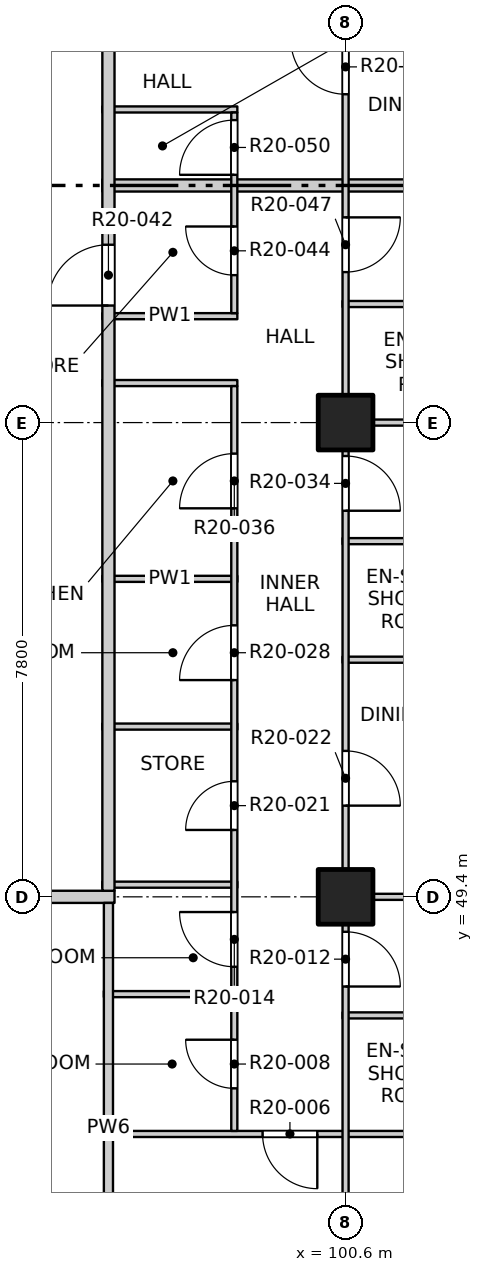
"""IFC4 building model, lengths in metres.
Left out: names, types, materials, properties, quantities, classifications, styles, units other than length and angle.
Written with IfcOpenShell. Run it as: python <this file> out.ifc"""

import sys

from ifc_helpers import new_model, si_unit, direction, frame, frame_2d, origin, origin_2d, place, context, subcontext, project, spatial, rectangle, extrude, element, fill, save


model = new_model("IFC4")
c1 = context("Model", 3, precision=1e-05, world=origin(), true_north=direction((0.0, 1.0)))
c2 = subcontext(c1, "Body", "Model", "MODEL_VIEW")
j1 = project(units=[si_unit("LENGTHUNIT", "METRE"), si_unit("PLANEANGLEUNIT", "RADIAN")], contexts=[c1])
p1 = place(None, origin())
s1 = spatial("IfcSite", under=j1, at=p1, CompositionType="ELEMENT")
p2 = place(p1, origin())
s2 = spatial("IfcBuilding", under=s1, at=p2, CompositionType="ELEMENT")
p3 = place(p2, frame((0.0, 0.0, 210.9)))
s3 = spatial("IfcBuildingStorey", under=s2, at=p3, CompositionType="ELEMENT", Elevation=210.9)
for number, where, z_axis, x_axis in (
    (1, (100.6, 49.4, -0.25), (0.0, 0.0, 1.0), (1.0, 0.0, 0.0)),
    (2, (100.6, 57.2, -0.25), (0.0, 0.0, 1.0), (1.0, 0.0, 0.0)),
):
    element("IfcColumn", number, at=place(p3, frame(where, z_axis=z_axis, x_axis=x_axis)), inside=s3, PredefinedType="COLUMN", context=c2, shape_type="SweptSolid", body=[
        extrude(rectangle(XDim=0.9, YDim=0.9, at=origin_2d()), origin(), (0.0, 0.0, 1.0), 3.4),
    ])
p4 = place(p3, frame((96.625, 45.5, 0.0), z_axis=(0.0, 0.0, 1.0), x_axis=(1.0, 0.0, 0.0)))
e3 = element("IfcWall", 3, at=p4, inside=s3, PredefinedType="PARTITIONING", context=c2, shape_type="SweptSolid", body=[
    extrude(rectangle(XDim=11.475, YDim=0.1, at=frame_2d((5.738, 0.0))), origin(), (0.0, 0.0, 1.0), 3.15),
])
p5 = place(p4, frame((2.61, 0.0, 0.0)))
e4 = element("IfcOpeningElement", 4, at=p5, cuts=e3, PredefinedType="OPENING", context=c2, shape_type="SweptSolid", body=[
    extrude(rectangle(XDim=0.9, YDim=2.1, at=frame_2d((0.45, 1.05))), frame((0.0, 0.06, 0.0), z_axis=(0.0, -1.0, 0.0), x_axis=(1.0, 0.0, 0.0)), (0.0, 0.0, 1.0), 0.12),
])
p6 = place(p3, frame((100.55, 47.45, 0.0), z_axis=(0.0, 0.0, 1.0), x_axis=(1.0, 0.0, 0.0)))
e5 = element("IfcWall", 5, at=p6, inside=s3, PredefinedType="PARTITIONING", context=c2, shape_type="SweptSolid", body=[
    extrude(rectangle(XDim=3.4, YDim=0.1, at=frame_2d((1.7, 0.0))), origin(), (0.0, 0.0, 1.0), 3.15),
])
p7 = place(p3, frame((96.625, 47.8, 0.0), z_axis=(0.0, 0.0, 1.0), x_axis=(1.0, 0.0, 0.0)))
e6 = element("IfcWall", 6, at=p7, inside=s3, PredefinedType="PARTITIONING", context=c2, shape_type="SweptSolid", body=[
    extrude(rectangle(XDim=2.195, YDim=0.1, at=frame_2d((1.098, 0.0))), origin(), (0.0, 0.0, 1.0), 3.15),
])
p8 = place(p3, frame((73.2, 49.4, 0.0), z_axis=(0.0, 0.0, 1.0), x_axis=(1.0, 0.0, 0.0)))
e7 = element("IfcWall", 7, at=p8, inside=s3, PredefinedType="PARTITIONING", context=c2, shape_type="SweptSolid", body=[
    extrude(rectangle(XDim=23.6, YDim=0.2, at=frame_2d((11.8, 0.0))), origin(), (0.0, 0.0, 1.0), 3.15),
])
p9 = place(p8, frame((1.6, 0.0, 0.0)))
e8 = element("IfcOpeningElement", 8, at=p9, cuts=e7, PredefinedType="OPENING", context=c2, shape_type="SweptSolid", body=[
    extrude(rectangle(XDim=0.9, YDim=2.1, at=frame_2d((0.45, 1.05))), frame((0.0, 0.11, 0.0), z_axis=(0.0, -1.0, 0.0), x_axis=(1.0, 0.0, 0.0)), (0.0, 0.0, 1.0), 0.22),
])
p10 = place(p8, frame((5.5, 0.0, 0.0)))
e9 = element("IfcOpeningElement", 9, at=p10, cuts=e7, PredefinedType="OPENING", context=c2, shape_type="SweptSolid", body=[
    extrude(rectangle(XDim=0.9, YDim=2.1, at=frame_2d((0.45, 1.05))), frame((0.0, 0.11, 0.0), z_axis=(0.0, -1.0, 0.0), x_axis=(1.0, 0.0, 0.0)), (0.0, 0.0, 1.0), 0.22),
])
p11 = place(p8, frame((12.375, 0.0, 0.0)))
e10 = element("IfcOpeningElement", 10, at=p11, cuts=e7, PredefinedType="OPENING", context=c2, shape_type="SweptSolid", body=[
    extrude(rectangle(XDim=1.2, YDim=2.1, at=frame_2d((0.6, 1.05))), frame((0.0, 0.11, 0.0), z_axis=(0.0, -1.0, 0.0), x_axis=(1.0, 0.0, 0.0)), (0.0, 0.0, 1.0), 0.22),
])
p12 = place(p8, frame((20.15, 0.0, 0.0)))
e11 = element("IfcOpeningElement", 11, at=p12, cuts=e7, PredefinedType="OPENING", context=c2, shape_type="SweptSolid", body=[
    extrude(rectangle(XDim=1.2, YDim=2.1, at=frame_2d((0.6, 1.05))), frame((0.0, 0.11, 0.0), z_axis=(0.0, -1.0, 0.0), x_axis=(1.0, 0.0, 0.0)), (0.0, 0.0, 1.0), 0.22),
])
p13 = place(p3, frame((100.55, 49.4, 0.0), z_axis=(0.0, 0.0, 1.0), x_axis=(1.0, 0.0, 0.0)))
e12 = element("IfcWall", 12, at=p13, inside=s3, PredefinedType="PARTITIONING", context=c2, shape_type="SweptSolid", body=[
    extrude(rectangle(XDim=7.55, YDim=0.1, at=frame_2d((3.775, 0.0))), origin(), (0.0, 0.0, 1.0), 3.15),
])
for number, where, z_axis, x_axis in (
    (13, (96.6, 49.6, 0.0), (0.0, 0.0, 1.0), (1.0, 0.0, 0.0)),
    (14, (96.6, 52.2, 0.0), (0.0, 0.0, 1.0), (1.0, 0.0, 0.0)),
):
    element("IfcWall", number, at=place(p3, frame(where, z_axis=z_axis, x_axis=x_axis)), inside=s3, PredefinedType="PARTITIONING", context=c2, shape_type="SweptSolid", body=[
        extrude(rectangle(XDim=2.22, YDim=0.1, at=frame_2d((1.11, 0.0))), origin(), (0.0, 0.0, 1.0), 3.15),
    ])
p14 = place(p3, frame((100.55, 53.3, 0.0), z_axis=(0.0, 0.0, 1.0), x_axis=(1.0, 0.0, 0.0)))
e15 = element("IfcWall", 15, at=p14, inside=s3, PredefinedType="PARTITIONING", context=c2, shape_type="SweptSolid", body=[
    extrude(rectangle(XDim=7.55, YDim=0.1, at=frame_2d((3.775, 0.0))), origin(), (0.0, 0.0, 1.0), 3.15),
])
p15 = place(p3, frame((96.6, 54.63, 0.0), z_axis=(0.0, 0.0, 1.0), x_axis=(1.0, 0.0, 0.0)))
e16 = element("IfcWall", 16, at=p15, inside=s3, PredefinedType="PARTITIONING", context=c2, shape_type="SweptSolid", body=[
    extrude(rectangle(XDim=2.22, YDim=0.1, at=frame_2d((1.11, 0.0))), origin(), (0.0, 0.0, 1.0), 3.15),
])
p16 = place(p3, frame((100.55, 55.25, 0.0), z_axis=(0.0, 0.0, 1.0), x_axis=(1.0, 0.0, 0.0)))
e17 = element("IfcWall", 17, at=p16, inside=s3, PredefinedType="PARTITIONING", context=c2, shape_type="SweptSolid", body=[
    extrude(rectangle(XDim=3.4, YDim=0.1, at=frame_2d((1.7, 0.0))), origin(), (0.0, 0.0, 1.0), 3.15),
])
p17 = place(p3, frame((100.55, 57.2, 0.0), z_axis=(0.0, 0.0, 1.0), x_axis=(1.0, 0.0, 0.0)))
e18 = element("IfcWall", 18, at=p17, inside=s3, PredefinedType="PARTITIONING", context=c2, shape_type="SweptSolid", body=[
    extrude(rectangle(XDim=7.55, YDim=0.1, at=frame_2d((3.775, 0.0))), origin(), (0.0, 0.0, 1.0), 3.15),
])
for number, where, z_axis, x_axis in (
    (19, (96.6, 57.85, 0.0), (0.0, 0.0, 1.0), (1.0, 0.0, 0.0)),
    (20, (96.6, 58.95, 0.0), (0.0, 0.0, 1.0), (1.0, 0.0, 0.0)),
):
    element("IfcWall", number, at=place(p3, frame(where, z_axis=z_axis, x_axis=x_axis)), inside=s3, PredefinedType="PARTITIONING", context=c2, shape_type="SweptSolid", body=[
        extrude(rectangle(XDim=2.22, YDim=0.1, at=frame_2d((1.11, 0.0))), origin(), (0.0, 0.0, 1.0), 3.15),
    ])
p18 = place(p3, frame((100.55, 59.15, 0.0), z_axis=(0.0, 0.0, 1.0), x_axis=(1.0, 0.0, 0.0)))
e21 = element("IfcWall", 21, at=p18, inside=s3, PredefinedType="PARTITIONING", context=c2, shape_type="SweptSolid", body=[
    extrude(rectangle(XDim=3.4, YDim=0.1, at=frame_2d((1.7, 0.0))), origin(), (0.0, 0.0, 1.0), 3.15),
])
p19 = place(p3, frame((96.6, 61.1, 0.0), z_axis=(0.0, 0.0, 1.0), x_axis=(1.0, 0.0, 0.0)))
e22 = element("IfcWall", 22, at=p19, inside=s3, PredefinedType="PARTITIONING", context=c2, shape_type="SweptSolid", body=[
    extrude(rectangle(XDim=11.5, YDim=0.2, at=frame_2d((5.75, 0.0))), origin(), (0.0, 0.0, 1.0), 2.55),
])
p20 = place(p3, frame((96.6, 62.35, 0.0), z_axis=(0.0, 0.0, 1.0), x_axis=(1.0, 0.0, 0.0)))
e23 = element("IfcWall", 23, at=p20, inside=s3, PredefinedType="PARTITIONING", context=c2, shape_type="SweptSolid", body=[
    extrude(rectangle(XDim=2.22, YDim=0.1, at=frame_2d((1.11, 0.0))), origin(), (0.0, 0.0, 1.0), 3.15),
])
p21 = place(p3, frame((96.7, 41.9, 0.0), z_axis=(0.0, 0.0, 1.0), x_axis=(0.0, 1.0, 0.0)))
e24 = element("IfcWall", 24, at=p21, inside=s3, PredefinedType="PARTITIONING", context=c2, shape_type="SweptSolid", body=[
    extrude(rectangle(XDim=7.4, YDim=0.15, at=frame_2d((3.7, 0.0))), origin(), (0.0, 0.0, 1.0), 3.15),
])
p22 = place(p3, frame((96.7, 49.5, 0.0), z_axis=(0.0, 0.0, 1.0), x_axis=(0.0, 1.0, 0.0)))
e25 = element("IfcWall", 25, at=p22, inside=s3, PredefinedType="PARTITIONING", context=c2, shape_type="SweptSolid", body=[
    extrude(rectangle(XDim=34.9, YDim=0.2, at=frame_2d((17.45, 0.0))), origin(), (0.0, 0.0, 1.0), 3.15),
])
p23 = place(p22, frame((9.625, 0.0, 0.0)))
e26 = element("IfcOpeningElement", 26, at=p23, cuts=e25, PredefinedType="OPENING", context=c2, shape_type="SweptSolid", body=[
    extrude(rectangle(XDim=1.0, YDim=2.1, at=frame_2d((0.5, 1.05))), frame((0.0, 0.11, 0.0), z_axis=(0.0, -1.0, 0.0), x_axis=(1.0, 0.0, 0.0)), (0.0, 0.0, 1.0), 0.22),
])
p24 = place(p22, frame((14.125, 0.0, 0.0)))
e27 = element("IfcOpeningElement", 27, at=p24, cuts=e25, PredefinedType="OPENING", context=c2, shape_type="SweptSolid", body=[
    extrude(rectangle(XDim=1.0, YDim=2.1, at=frame_2d((0.5, 1.05))), frame((0.0, 0.11, 0.0), z_axis=(0.0, -1.0, 0.0), x_axis=(1.0, 0.0, 0.0)), (0.0, 0.0, 1.0), 0.22),
])
p25 = place(p22, frame((29.275, 0.0, 0.0)))
e28 = element("IfcOpeningElement", 28, at=p25, cuts=e25, PredefinedType="OPENING", context=c2, shape_type="SweptSolid", body=[
    extrude(rectangle(XDim=1.0, YDim=2.1, at=frame_2d((0.5, 1.05))), frame((0.0, 0.11, 0.0), z_axis=(0.0, -1.0, 0.0), x_axis=(1.0, 0.0, 0.0)), (0.0, 0.0, 1.0), 0.22),
])
p26 = place(p3, frame((98.77, 45.55, 0.0), z_axis=(0.0, 0.0, 1.0), x_axis=(0.0, 1.0, 0.0)))
e29 = element("IfcWall", 29, at=p26, inside=s3, PredefinedType="PARTITIONING", context=c2, shape_type="SweptSolid", body=[
    extrude(rectangle(XDim=12.25, YDim=0.1, at=frame_2d((6.125, 0.0))), origin(), (0.0, 0.0, 1.0), 3.15),
])
p27 = place(p26, frame((0.7, 0.0, 0.0)))
e30 = element("IfcOpeningElement", 30, at=p27, cuts=e29, PredefinedType="OPENING", context=c2, shape_type="SweptSolid", body=[
    extrude(rectangle(XDim=0.8, YDim=2.1, at=frame_2d((0.4, 1.05))), frame((0.0, 0.06, 0.0), z_axis=(0.0, -1.0, 0.0), x_axis=(1.0, 0.0, 0.0)), (0.0, 0.0, 1.0), 0.12),
])
p28 = place(p26, frame((2.7, 0.0, 0.0)))
e31 = element("IfcOpeningElement", 31, at=p28, cuts=e29, PredefinedType="OPENING", context=c2, shape_type="SweptSolid", body=[
    extrude(rectangle(XDim=0.9, YDim=2.1, at=frame_2d((0.45, 1.05))), frame((0.0, 0.06, 0.0), z_axis=(0.0, -1.0, 0.0), x_axis=(1.0, 0.0, 0.0)), (0.0, 0.0, 1.0), 0.12),
])
p29 = place(p26, frame((4.95, 0.0, 0.0)))
e32 = element("IfcOpeningElement", 32, at=p29, cuts=e29, PredefinedType="OPENING", context=c2, shape_type="SweptSolid", body=[
    extrude(rectangle(XDim=0.8, YDim=2.1, at=frame_2d((0.4, 1.05))), frame((0.0, 0.06, 0.0), z_axis=(0.0, -1.0, 0.0), x_axis=(1.0, 0.0, 0.0)), (0.0, 0.0, 1.0), 0.12),
])
p30 = place(p26, frame((7.415, 0.0, 0.0)))
e33 = element("IfcOpeningElement", 33, at=p30, cuts=e29, PredefinedType="OPENING", context=c2, shape_type="SweptSolid", body=[
    extrude(rectangle(XDim=0.9, YDim=2.1, at=frame_2d((0.45, 1.05))), frame((0.0, 0.06, 0.0), z_axis=(0.0, -1.0, 0.0), x_axis=(1.0, 0.0, 0.0)), (0.0, 0.0, 1.0), 0.12),
])
p31 = place(p26, frame((10.24, 0.0, 0.0)))
e34 = element("IfcOpeningElement", 34, at=p31, cuts=e29, PredefinedType="OPENING", context=c2, shape_type="SweptSolid", body=[
    extrude(rectangle(XDim=0.9, YDim=2.1, at=frame_2d((0.45, 1.05))), frame((0.0, 0.06, 0.0), z_axis=(0.0, -1.0, 0.0), x_axis=(1.0, 0.0, 0.0)), (0.0, 0.0, 1.0), 0.12),
])
p32 = place(p3, frame((98.77, 59.0, 0.0), z_axis=(0.0, 0.0, 1.0), x_axis=(0.0, 1.0, 0.0)))
e35 = element("IfcWall", 35, at=p32, inside=s3, PredefinedType="PARTITIONING", context=c2, shape_type="SweptSolid", body=[
    extrude(rectangle(XDim=3.3, YDim=0.1, at=frame_2d((1.65, 0.0))), origin(), (0.0, 0.0, 1.0), 3.15),
])
p33 = place(p32, frame((0.625, 0.0, 0.0)))
e36 = element("IfcOpeningElement", 36, at=p33, cuts=e35, PredefinedType="OPENING", context=c2, shape_type="SweptSolid", body=[
    extrude(rectangle(XDim=0.8, YDim=2.1, at=frame_2d((0.4, 1.05))), frame((0.0, 0.06, 0.0), z_axis=(0.0, -1.0, 0.0), x_axis=(1.0, 0.0, 0.0)), (0.0, 0.0, 1.0), 0.12),
])
p34 = place(p32, frame((2.275, 0.0, 0.0)))
e37 = element("IfcOpeningElement", 37, at=p34, cuts=e35, PredefinedType="OPENING", context=c2, shape_type="SweptSolid", body=[
    extrude(rectangle(XDim=0.9, YDim=2.1, at=frame_2d((0.45, 1.05))), frame((0.0, 0.06, 0.0), z_axis=(0.0, -1.0, 0.0), x_axis=(1.0, 0.0, 0.0)), (0.0, 0.0, 1.0), 0.12),
])
p35 = place(p3, frame((100.6, 41.9, 0.0), z_axis=(0.0, 0.0, 1.0), x_axis=(0.0, 1.0, 0.0)))
e38 = element("IfcWall", 38, at=p35, inside=s3, PredefinedType="PARTITIONING", context=c2, shape_type="SweptSolid", body=[
    extrude(rectangle(XDim=46.2, YDim=0.1, at=frame_2d((23.1, 0.0))), origin(), (0.0, 0.0, 1.0), 3.15),
])
p36 = place(p35, frame((1.2, 0.0, 0.0)))
e39 = element("IfcOpeningElement", 39, at=p36, cuts=e38, PredefinedType="OPENING", context=c2, shape_type="SweptSolid", body=[
    extrude(rectangle(XDim=0.9, YDim=2.1, at=frame_2d((0.45, 1.05))), frame((0.0, 0.06, 0.0), z_axis=(0.0, -1.0, 0.0), x_axis=(1.0, 0.0, 0.0)), (0.0, 0.0, 1.0), 0.12),
])
p37 = place(p35, frame((6.025, 0.0, 0.0)))
e40 = element("IfcOpeningElement", 40, at=p37, cuts=e38, PredefinedType="OPENING", context=c2, shape_type="SweptSolid", body=[
    extrude(rectangle(XDim=0.9, YDim=2.1, at=frame_2d((0.45, 1.05))), frame((0.0, 0.06, 0.0), z_axis=(0.0, -1.0, 0.0), x_axis=(1.0, 0.0, 0.0)), (0.0, 0.0, 1.0), 0.12),
])
p38 = place(p35, frame((9.0, 0.0, 0.0)))
e41 = element("IfcOpeningElement", 41, at=p38, cuts=e38, PredefinedType="OPENING", context=c2, shape_type="SweptSolid", body=[
    extrude(rectangle(XDim=0.9, YDim=2.1, at=frame_2d((0.45, 1.05))), frame((0.0, 0.06, 0.0), z_axis=(0.0, -1.0, 0.0), x_axis=(1.0, 0.0, 0.0)), (0.0, 0.0, 1.0), 0.12),
])
p39 = place(p35, frame((13.85, 0.0, 0.0)))
e42 = element("IfcOpeningElement", 42, at=p39, cuts=e38, PredefinedType="OPENING", context=c2, shape_type="SweptSolid", body=[
    extrude(rectangle(XDim=0.9, YDim=2.1, at=frame_2d((0.45, 1.05))), frame((0.0, 0.06, 0.0), z_axis=(0.0, -1.0, 0.0), x_axis=(1.0, 0.0, 0.0)), (0.0, 0.0, 1.0), 0.12),
])
p40 = place(p35, frame((17.775, 0.0, 0.0)))
e43 = element("IfcOpeningElement", 43, at=p40, cuts=e38, PredefinedType="OPENING", context=c2, shape_type="SweptSolid", body=[
    extrude(rectangle(XDim=0.9, YDim=2.1, at=frame_2d((0.45, 1.05))), frame((0.0, 0.06, 0.0), z_axis=(0.0, -1.0, 0.0), x_axis=(1.0, 0.0, 0.0)), (0.0, 0.0, 1.0), 0.12),
])
p41 = place(p35, frame((20.7, 0.0, 0.0)))
e44 = element("IfcOpeningElement", 44, at=p41, cuts=e38, PredefinedType="OPENING", context=c2, shape_type="SweptSolid", body=[
    extrude(rectangle(XDim=0.9, YDim=2.1, at=frame_2d((0.45, 1.05))), frame((0.0, 0.06, 0.0), z_axis=(0.0, -1.0, 0.0), x_axis=(1.0, 0.0, 0.0)), (0.0, 0.0, 1.0), 0.12),
])
p42 = place(p35, frame((24.6, 0.0, 0.0)))
e45 = element("IfcOpeningElement", 45, at=p42, cuts=e38, PredefinedType="OPENING", context=c2, shape_type="SweptSolid", body=[
    extrude(rectangle(XDim=0.9, YDim=2.1, at=frame_2d((0.45, 1.05))), frame((0.0, 0.06, 0.0), z_axis=(0.0, -1.0, 0.0), x_axis=(1.0, 0.0, 0.0)), (0.0, 0.0, 1.0), 0.12),
])
p43 = place(p35, frame((29.425, 0.0, 0.0)))
e46 = element("IfcOpeningElement", 46, at=p43, cuts=e38, PredefinedType="OPENING", context=c2, shape_type="SweptSolid", body=[
    extrude(rectangle(XDim=0.9, YDim=2.1, at=frame_2d((0.45, 1.05))), frame((0.0, 0.06, 0.0), z_axis=(0.0, -1.0, 0.0), x_axis=(1.0, 0.0, 0.0)), (0.0, 0.0, 1.0), 0.12),
])
p44 = place(p35, frame((33.375, 0.0, 0.0)))
e47 = element("IfcOpeningElement", 47, at=p44, cuts=e38, PredefinedType="OPENING", context=c2, shape_type="SweptSolid", body=[
    extrude(rectangle(XDim=0.9, YDim=2.1, at=frame_2d((0.45, 1.05))), frame((0.0, 0.06, 0.0), z_axis=(0.0, -1.0, 0.0), x_axis=(1.0, 0.0, 0.0)), (0.0, 0.0, 1.0), 0.12),
])
p45 = place(p35, frame((36.3, 0.0, 0.0)))
e48 = element("IfcOpeningElement", 48, at=p45, cuts=e38, PredefinedType="OPENING", context=c2, shape_type="SweptSolid", body=[
    extrude(rectangle(XDim=0.9, YDim=2.1, at=frame_2d((0.45, 1.05))), frame((0.0, 0.06, 0.0), z_axis=(0.0, -1.0, 0.0), x_axis=(1.0, 0.0, 0.0)), (0.0, 0.0, 1.0), 0.12),
])
p46 = place(p35, frame((41.175, 0.0, 0.0)))
e49 = element("IfcOpeningElement", 49, at=p46, cuts=e38, PredefinedType="OPENING", context=c2, shape_type="SweptSolid", body=[
    extrude(rectangle(XDim=0.9, YDim=2.1, at=frame_2d((0.45, 1.05))), frame((0.0, 0.06, 0.0), z_axis=(0.0, -1.0, 0.0), x_axis=(1.0, 0.0, 0.0)), (0.0, 0.0, 1.0), 0.12),
])
p47 = place(p35, frame((44.1, 0.0, 0.0)))
e50 = element("IfcOpeningElement", 50, at=p47, cuts=e38, PredefinedType="OPENING", context=c2, shape_type="SweptSolid", body=[
    extrude(rectangle(XDim=0.9, YDim=2.1, at=frame_2d((0.45, 1.05))), frame((0.0, 0.06, 0.0), z_axis=(0.0, -1.0, 0.0), x_axis=(1.0, 0.0, 0.0)), (0.0, 0.0, 1.0), 0.12),
])
p48 = place(p5, origin())
e51 = element("IfcDoor", 51, at=p48, inside=s3, OperationType="SINGLE_SWING_LEFT", PredefinedType="DOOR", context=c2, shape_type="SweptSolid", body=[
    extrude(rectangle(XDim=0.9, YDim=2.1, at=frame_2d((0.45, 1.05))), frame((0.0, 0.025, 0.0), z_axis=(0.0, -1.0, 0.0), x_axis=(1.0, 0.0, 0.0)), (0.0, 0.0, 1.0), 0.05),
])
fill(e4, e51)
p49 = place(p27, origin())
e52 = element("IfcDoor", 52, at=p49, inside=s3, OperationType="SINGLE_SWING_RIGHT", PredefinedType="DOOR", context=c2, shape_type="SweptSolid", body=[
    extrude(rectangle(XDim=0.8, YDim=2.1, at=frame_2d((0.4, 1.05))), frame((0.0, 0.025, 0.0), z_axis=(0.0, -1.0, 0.0), x_axis=(1.0, 0.0, 0.0)), (0.0, 0.0, 1.0), 0.05),
])
fill(e30, e52)
p50 = place(p37, origin())
e53 = element("IfcDoor", 53, at=p50, inside=s3, OperationType="SINGLE_SWING_RIGHT", PredefinedType="DOOR", context=c2, shape_type="SweptSolid", body=[
    extrude(rectangle(XDim=0.9, YDim=2.1, at=frame_2d((0.45, 1.05))), frame((0.0, 0.025, 0.0), z_axis=(0.0, -1.0, 0.0), x_axis=(1.0, 0.0, 0.0)), (0.0, 0.0, 1.0), 0.05),
])
fill(e40, e53)
p51 = place(p28, origin())
e54 = element("IfcDoor", 54, at=p51, inside=s3, OperationType="SINGLE_SWING_RIGHT", PredefinedType="DOOR", context=c2, shape_type="SweptSolid", body=[
    extrude(rectangle(XDim=0.9, YDim=2.1, at=frame_2d((0.45, 1.05))), frame((0.0, 0.025, 0.0), z_axis=(0.0, -1.0, 0.0), x_axis=(1.0, 0.0, 0.0)), (0.0, 0.0, 1.0), 0.05),
])
fill(e31, e54)
p52 = place(p29, origin())
e55 = element("IfcDoor", 55, at=p52, inside=s3, OperationType="SINGLE_SWING_LEFT", PredefinedType="DOOR", context=c2, shape_type="SweptSolid", body=[
    extrude(rectangle(XDim=0.8, YDim=2.1, at=frame_2d((0.4, 1.05))), frame((0.0, 0.025, 0.0), z_axis=(0.0, -1.0, 0.0), x_axis=(1.0, 0.0, 0.0)), (0.0, 0.0, 1.0), 0.05),
])
fill(e32, e55)
p53 = place(p38, origin())
e56 = element("IfcDoor", 56, at=p53, inside=s3, OperationType="SINGLE_SWING_RIGHT", PredefinedType="DOOR", context=c2, shape_type="SweptSolid", body=[
    extrude(rectangle(XDim=0.9, YDim=2.1, at=frame_2d((0.45, 1.05))), frame((0.0, 0.025, 0.0), z_axis=(0.0, -1.0, 0.0), x_axis=(1.0, 0.0, 0.0)), (0.0, 0.0, 1.0), 0.05),
])
fill(e41, e56)
p54 = place(p30, origin())
e57 = element("IfcDoor", 57, at=p54, inside=s3, OperationType="SINGLE_SWING_LEFT", PredefinedType="DOOR", context=c2, shape_type="SweptSolid", body=[
    extrude(rectangle(XDim=0.9, YDim=2.1, at=frame_2d((0.45, 1.05))), frame((0.0, 0.025, 0.0), z_axis=(0.0, -1.0, 0.0), x_axis=(1.0, 0.0, 0.0)), (0.0, 0.0, 1.0), 0.05),
])
fill(e33, e57)
p55 = place(p39, origin())
e58 = element("IfcDoor", 58, at=p55, inside=s3, OperationType="SINGLE_SWING_RIGHT", PredefinedType="DOOR", context=c2, shape_type="SweptSolid", body=[
    extrude(rectangle(XDim=0.9, YDim=2.1, at=frame_2d((0.45, 1.05))), frame((0.0, 0.025, 0.0), z_axis=(0.0, -1.0, 0.0), x_axis=(1.0, 0.0, 0.0)), (0.0, 0.0, 1.0), 0.05),
])
fill(e42, e58)
p56 = place(p31, origin())
e59 = element("IfcDoor", 59, at=p56, inside=s3, OperationType="SINGLE_SWING_LEFT", PredefinedType="DOOR", context=c2, shape_type="SweptSolid", body=[
    extrude(rectangle(XDim=0.9, YDim=2.1, at=frame_2d((0.45, 1.05))), frame((0.0, 0.025, 0.0), z_axis=(0.0, -1.0, 0.0), x_axis=(1.0, 0.0, 0.0)), (0.0, 0.0, 1.0), 0.05),
])
fill(e34, e59)
p57 = place(p23, origin())
e60 = element("IfcDoor", 60, at=p57, inside=s3, OperationType="SINGLE_SWING_LEFT", PredefinedType="DOOR", context=c2, shape_type="SweptSolid", body=[
    extrude(rectangle(XDim=1.0, YDim=2.1, at=frame_2d((0.5, 1.05))), frame((0.0, 0.025, 0.0), z_axis=(0.0, -1.0, 0.0), x_axis=(1.0, 0.0, 0.0)), (0.0, 0.0, 1.0), 0.05),
])
fill(e26, e60)
p58 = place(p33, origin())
e61 = element("IfcDoor", 61, at=p58, inside=s3, OperationType="SINGLE_SWING_RIGHT", PredefinedType="DOOR", context=c2, shape_type="SweptSolid", body=[
    extrude(rectangle(XDim=0.8, YDim=2.1, at=frame_2d((0.4, 1.05))), frame((0.0, 0.025, 0.0), z_axis=(0.0, -1.0, 0.0), x_axis=(1.0, 0.0, 0.0)), (0.0, 0.0, 1.0), 0.05),
])
fill(e36, e61)
p59 = place(p40, origin())
e62 = element("IfcDoor", 62, at=p59, inside=s3, OperationType="SINGLE_SWING_LEFT", PredefinedType="DOOR", context=c2, shape_type="SweptSolid", body=[
    extrude(rectangle(XDim=0.9, YDim=2.1, at=frame_2d((0.45, 1.05))), frame((0.0, 0.025, 0.0), z_axis=(0.0, -1.0, 0.0), x_axis=(1.0, 0.0, 0.0)), (0.0, 0.0, 1.0), 0.05),
])
fill(e43, e62)
p60 = place(p34, origin())
e63 = element("IfcDoor", 63, at=p60, inside=s3, OperationType="SINGLE_SWING_LEFT", PredefinedType="DOOR", context=c2, shape_type="SweptSolid", body=[
    extrude(rectangle(XDim=0.9, YDim=2.1, at=frame_2d((0.45, 1.05))), frame((0.0, 0.025, 0.0), z_axis=(0.0, -1.0, 0.0), x_axis=(1.0, 0.0, 0.0)), (0.0, 0.0, 1.0), 0.05),
])
fill(e37, e63)
p61 = place(p41, origin())
e64 = element("IfcDoor", 64, at=p61, inside=s3, OperationType="SINGLE_SWING_RIGHT", PredefinedType="DOOR", context=c2, shape_type="SweptSolid", body=[
    extrude(rectangle(XDim=0.9, YDim=2.1, at=frame_2d((0.45, 1.05))), frame((0.0, 0.025, 0.0), z_axis=(0.0, -1.0, 0.0), x_axis=(1.0, 0.0, 0.0)), (0.0, 0.0, 1.0), 0.05),
])
fill(e44, e64)
save(model, sys.argv[1])
